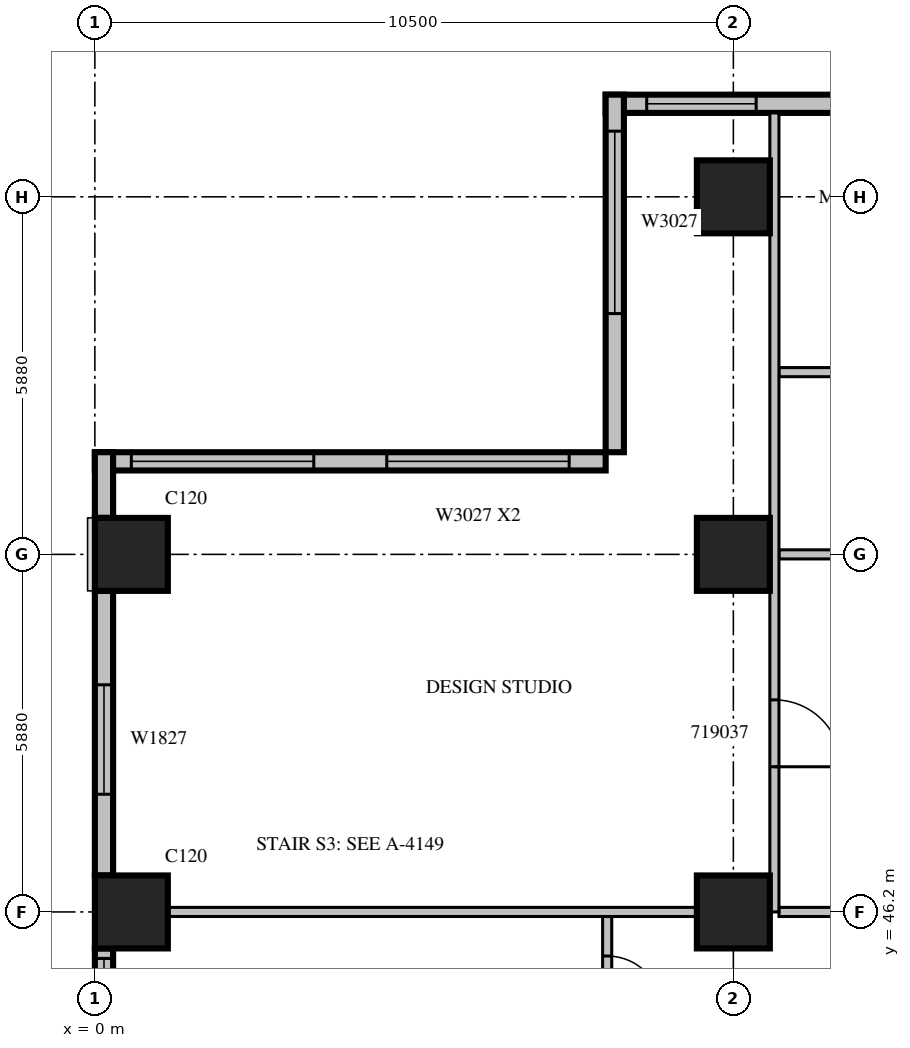
"""IFC4 building model, lengths in metres.
Left out: names, types, materials, properties, quantities, classifications, styles, units other than length and angle.
Written with IfcOpenShell. Run it as: python <this file> out.ifc"""

import sys

from ifc_helpers import new_model, si_unit, direction, frame, frame_2d, origin, origin_2d, place, context, subcontext, project, spatial, rectangle, extrude, source, transform, mapped, element, fill, save


model = new_model("IFC4")
c1 = context("Model", 3, precision=1e-05, world=origin(), true_north=direction((0.0, 1.0)))
c2 = subcontext(c1, "Body", "Model", "MODEL_VIEW")
j1 = project(units=[si_unit("LENGTHUNIT", "METRE"), si_unit("PLANEANGLEUNIT", "RADIAN")], contexts=[c1])
p1 = place(None, origin())
s1 = spatial("IfcSite", under=j1, at=p1, CompositionType="ELEMENT")
p2 = place(p1, origin())
s2 = spatial("IfcBuilding", under=s1, at=p2, CompositionType="ELEMENT")
p3 = place(p2, frame((0.0, 0.0, 90.9)))
s3 = spatial("IfcBuildingStorey", under=s2, at=p3, CompositionType="ELEMENT", Elevation=90.9)
m1 = source(origin(), c2, "Body", "SweptSolid", [
    extrude(rectangle(XDim=1.2, YDim=1.2, at=origin_2d()), origin(), (0.0, 0.0, 1.0), 4.2),
])
for number, where, z_axis, x_axis in (
    (1, (0.6, 46.2, 0.0), (0.0, 0.0, 1.0), (1.0, 0.0, 0.0)),
    (2, (10.5, 46.2, 0.0), (0.0, 0.0, 1.0), (1.0, 0.0, 0.0)),
    (3, (0.6, 52.08, 0.0), (0.0, 0.0, 1.0), (1.0, 0.0, 0.0)),
    (4, (10.5, 52.08, 0.0), (0.0, 0.0, 1.0), (1.0, 0.0, 0.0)),
    (5, (10.5, 57.96, 0.0), (0.0, 0.0, 1.0), (1.0, 0.0, 0.0)),
):
    element("IfcColumn", number, at=place(p3, frame(where, z_axis=z_axis, x_axis=x_axis)), inside=s3, PredefinedType="COLUMN", context=c2, shape_type="MappedRepresentation", body=[
        mapped(m1, transform((0.0, 0.0, 0.0), scale=1.0)),
    ])
m2 = source(origin(), c2, "Body", "SweptSolid", [
    extrude(rectangle(XDim=8.7, YDim=0.3, at=frame_2d((4.35, 0.0))), origin(), (0.0, 0.0, 1.0), 3.8),
])
p4 = place(p3, frame((17.1, 59.49, 0.0), z_axis=(0.0, 0.0, 1.0), x_axis=(-1.0, 0.0, 0.0)))
e6 = element("IfcWall", 6, at=p4, inside=s3, PredefinedType="STANDARD", context=c2, shape_type="MappedRepresentation", body=[
    mapped(m2, transform((0.0, 0.0, 0.0), scale=1.0)),
])
m3 = source(origin(), c2, "Body", "SweptSolid", [
    extrude(rectangle(XDim=1.8, YDim=2.7, at=frame_2d((0.9, 1.35))), frame((0.0, 0.16, 0.0), z_axis=(0.0, -1.0, 0.0), x_axis=(1.0, 0.0, 0.0)), (0.0, 0.0, 1.0), 0.32),
])
p5 = place(p4, frame((3.075, 0.0, 0.6)))
e7 = element("IfcOpeningElement", 7, at=p5, cuts=e6, PredefinedType="OPENING", context=c2, shape_type="MappedRepresentation", body=[
    mapped(m3, transform((0.0, 0.0, 0.0), scale=1.0)),
])
p6 = place(p4, frame((6.225, 0.0, 0.6)))
e8 = element("IfcOpeningElement", 8, at=p6, cuts=e6, PredefinedType="OPENING", context=c2, shape_type="MappedRepresentation", body=[
    mapped(m3, transform((0.0, 0.0, 0.0), scale=1.0)),
])
m4 = source(origin(), c2, "Body", "SweptSolid", [
    extrude(rectangle(XDim=5.88, YDim=0.3, at=frame_2d((2.94, 0.0))), origin(), (0.0, 0.0, 1.0), 3.8),
])
p7 = place(p3, frame((8.55, 59.64, 0.0), z_axis=(0.0, 0.0, 1.0), x_axis=(0.0, -1.0, 0.0)))
e9 = element("IfcWall", 9, at=p7, inside=s3, PredefinedType="STANDARD", context=c2, shape_type="MappedRepresentation", body=[
    mapped(m4, transform((0.0, 0.0, 0.0), scale=1.0)),
])
m5 = source(origin(), c2, "Body", "SweptSolid", [
    extrude(rectangle(XDim=3.0, YDim=2.7, at=frame_2d((1.5, 1.35))), frame((0.0, 0.16, 0.0), z_axis=(0.0, -1.0, 0.0), x_axis=(1.0, 0.0, 0.0)), (0.0, 0.0, 1.0), 0.32),
])
p8 = place(p7, frame((0.6, 0.0, 0.6)))
e10 = element("IfcOpeningElement", 10, at=p8, cuts=e9, PredefinedType="OPENING", context=c2, shape_type="MappedRepresentation", body=[
    mapped(m5, transform((0.0, 0.0, 0.0), scale=1.0)),
])
m6 = source(origin(), c2, "Body", "SweptSolid", [
    extrude(rectangle(XDim=8.4, YDim=0.3, at=frame_2d((4.2, 0.0))), origin(), (0.0, 0.0, 1.0), 3.8),
])
p9 = place(p3, frame((8.4, 53.61, 0.0), z_axis=(0.0, 0.0, 1.0), x_axis=(-1.0, 0.0, 0.0)))
e11 = element("IfcWall", 11, at=p9, inside=s3, PredefinedType="STANDARD", context=c2, shape_type="MappedRepresentation", body=[
    mapped(m6, transform((0.0, 0.0, 0.0), scale=1.0)),
])
p10 = place(p9, frame((0.6, 0.0, 0.6)))
e12 = element("IfcOpeningElement", 12, at=p10, cuts=e11, PredefinedType="OPENING", context=c2, shape_type="MappedRepresentation", body=[
    mapped(m5, transform((0.0, 0.0, 0.0), scale=1.0)),
])
p11 = place(p9, frame((4.8, 0.0, 0.6)))
e13 = element("IfcOpeningElement", 13, at=p11, cuts=e11, PredefinedType="OPENING", context=c2, shape_type="MappedRepresentation", body=[
    mapped(m5, transform((0.0, 0.0, 0.0), scale=1.0)),
])
m7 = source(origin(), c2, "Body", "SweptSolid", [
    extrude(rectangle(XDim=1.08, YDim=0.3, at=frame_2d((0.54, 0.0))), origin(), (0.0, 0.0, 1.0), 3.8),
])
p12 = place(p3, frame((0.15, 53.76, 0.0), z_axis=(0.0, 0.0, 1.0), x_axis=(0.0, -1.0, 0.0)))
e14 = element("IfcWall", 14, at=p12, inside=s3, PredefinedType="STANDARD", context=c2, shape_type="MappedRepresentation", body=[
    mapped(m7, transform((0.0, 0.0, 0.0), scale=1.0)),
])
m8 = source(origin(), c2, "Body", "SweptSolid", [
    extrude(rectangle(XDim=4.68, YDim=0.3, at=frame_2d((2.34, 0.0))), origin(), (0.0, 0.0, 1.0), 3.8),
])
p13 = place(p3, frame((0.15, 51.48, 0.0), z_axis=(0.0, 0.0, 1.0), x_axis=(0.0, -1.0, 0.0)))
e15 = element("IfcWall", 15, at=p13, inside=s3, PredefinedType="STANDARD", context=c2, shape_type="MappedRepresentation", body=[
    mapped(m8, transform((0.0, 0.0, 0.0), scale=1.0)),
])
p14 = place(p13, frame((1.545, 0.0, 0.6)))
e16 = element("IfcOpeningElement", 16, at=p14, cuts=e15, PredefinedType="OPENING", context=c2, shape_type="MappedRepresentation", body=[
    mapped(m3, transform((0.0, 0.0, 0.0), scale=1.0)),
])
m9 = source(origin(), c2, "Body", "SweptSolid", [
    extrude(rectangle(XDim=1.6, YDim=0.3, at=frame_2d((0.8, 0.0))), origin(), (0.0, 0.0, 1.0), 3.8),
])
p15 = place(p3, frame((0.15, 45.6, 0.0), z_axis=(0.0, 0.0, 1.0), x_axis=(0.0, -1.0, 0.0)))
e17 = element("IfcWall", 17, at=p15, inside=s3, PredefinedType="STANDARD", context=c2, shape_type="MappedRepresentation", body=[
    mapped(m9, transform((0.0, 0.0, 0.0), scale=1.0)),
])
m10 = source(origin(), c2, "Body", "SweptSolid", [
    extrude(rectangle(XDim=1.2, YDim=2.7, at=frame_2d((0.6, 1.35))), frame((0.0, 0.16, 0.0), z_axis=(0.0, -1.0, 0.0), x_axis=(1.0, 0.0, 0.0)), (0.0, 0.0, 1.0), 0.32),
])
p16 = place(p15, frame((0.165, 0.0, 0.6)))
e18 = element("IfcOpeningElement", 18, at=p16, cuts=e17, PredefinedType="OPENING", context=c2, shape_type="MappedRepresentation", body=[
    mapped(m10, transform((0.0, 0.0, 0.0), scale=1.0)),
])
m11 = source(origin(), c2, "Body", "SweptSolid", [
    extrude(rectangle(XDim=2.2, YDim=0.15, at=frame_2d((1.1, 0.0))), origin(), (0.0, 0.0, 1.0), 3.8),
])
p17 = place(p3, frame((8.425, 43.925, 0.0), z_axis=(0.0, 0.0, 1.0), x_axis=(0.0, 1.0, 0.0)))
e19 = element("IfcWall", 19, at=p17, inside=s3, PredefinedType="PARTITIONING", context=c2, shape_type="MappedRepresentation", body=[
    mapped(m11, transform((0.0, 0.0, 0.0), scale=1.0)),
])
m12 = source(origin(), c2, "Body", "SweptSolid", [
    extrude(rectangle(XDim=0.9, YDim=2.1, at=frame_2d((0.45, 1.05))), frame((0.0, 0.085, 0.0), z_axis=(0.0, -1.0, 0.0), x_axis=(1.0, 0.0, 0.0)), (0.0, 0.0, 1.0), 0.17),
])
p18 = place(p17, frame((0.65, 0.0, 0.0)))
e20 = element("IfcOpeningElement", 20, at=p18, cuts=e19, PredefinedType="OPENING", context=c2, shape_type="MappedRepresentation", body=[
    mapped(m12, transform((0.0, 0.0, 0.0), scale=1.0)),
])
m13 = source(origin(), c2, "Body", "SweptSolid", [
    extrude(rectangle(XDim=3.75, YDim=0.15, at=frame_2d((1.875, 0.0))), origin(), (0.0, 0.0, 1.0), 3.8),
])
for number, where, z_axis, x_axis in (
    (21, (15.0, 52.08, 0.0), (0.0, 0.0, 1.0), (-1.0, 0.0, 0.0)),
    (22, (15.0, 55.077, 0.0), (0.0, 0.0, 1.0), (-1.0, 0.0, 0.0)),
):
    element("IfcWall", number, at=place(p3, frame(where, z_axis=z_axis, x_axis=x_axis)), inside=s3, PredefinedType="PARTITIONING", context=c2, shape_type="MappedRepresentation", body=[
        mapped(m13, transform((0.0, 0.0, 0.0), scale=1.0)),
    ])
m14 = source(origin(), c2, "Body", "SweptSolid", [
    extrude(rectangle(XDim=8.702, YDim=0.15, at=frame_2d((4.351, 0.0))), origin(), (0.0, 0.0, 1.0), 3.8),
])
p19 = place(p3, frame((9.901, 46.2, 0.0), z_axis=(0.0, 0.0, 1.0), x_axis=(-1.0, 0.0, 0.0)))
e23 = element("IfcWall", 23, at=p19, inside=s3, PredefinedType="PARTITIONING", context=c2, shape_type="MappedRepresentation", body=[
    mapped(m14, transform((0.0, 0.0, 0.0), scale=1.0)),
])
p20 = place(p3, frame((15.0, 46.2, 0.0), z_axis=(0.0, 0.0, 1.0), x_axis=(-1.0, 0.0, 0.0)))
e24 = element("IfcWall", 24, at=p20, inside=s3, PredefinedType="PARTITIONING", context=c2, shape_type="MappedRepresentation", body=[
    mapped(m13, transform((0.0, 0.0, 0.0), scale=1.0)),
])
m15 = source(origin(), c2, "Body", "SweptSolid", [
    extrude(rectangle(XDim=13.14, YDim=0.15, at=frame_2d((6.57, 0.0))), origin(), (0.0, 0.0, 1.0), 3.8),
])
p21 = place(p3, frame((11.175, 46.2, 0.0), z_axis=(0.0, 0.0, 1.0), x_axis=(0.0, 1.0, 0.0)))
e25 = element("IfcWall", 25, at=p21, inside=s3, PredefinedType="PARTITIONING", context=c2, shape_type="MappedRepresentation", body=[
    mapped(m15, transform((0.0, 0.0, 0.0), scale=1.0)),
])
m16 = source(origin(), c2, "Body", "SweptSolid", [
    extrude(rectangle(XDim=1.1, YDim=2.1, at=frame_2d((0.55, 1.05))), frame((0.0, 0.085, 0.0), z_axis=(0.0, -1.0, 0.0), x_axis=(1.0, 0.0, 0.0)), (0.0, 0.0, 1.0), 0.17),
])
p22 = place(p21, frame((2.388, 0.0, 0.0)))
e26 = element("IfcOpeningElement", 26, at=p22, cuts=e25, PredefinedType="OPENING", context=c2, shape_type="MappedRepresentation", body=[
    mapped(m16, transform((0.0, 0.0, 0.0), scale=1.0)),
])
m17 = source(origin(), c2, "Body", "SweptSolid", [
    extrude(rectangle(XDim=1.8, YDim=2.7, at=frame_2d((0.9, 1.35))), frame((0.0, 0.03, 0.0), z_axis=(0.0, -1.0, 0.0), x_axis=(1.0, 0.0, 0.0)), (0.0, 0.0, 1.0), 0.06),
])
p23 = place(p6, origin())
e27 = element("IfcWindow", 27, at=p23, inside=s3, PartitioningType="SINGLE_PANEL", PredefinedType="WINDOW", context=c2, shape_type="MappedRepresentation", body=[
    mapped(m17, transform((0.0, 0.0, 0.0), scale=1.0)),
])
fill(e8, e27)
m18 = source(origin(), c2, "Body", "SweptSolid", [
    extrude(rectangle(XDim=3.0, YDim=2.7, at=frame_2d((1.5, 1.35))), frame((0.0, 0.03, 0.0), z_axis=(0.0, -1.0, 0.0), x_axis=(1.0, 0.0, 0.0)), (0.0, 0.0, 1.0), 0.06),
])
p24 = place(p8, origin())
e28 = element("IfcWindow", 28, at=p24, inside=s3, PartitioningType="SINGLE_PANEL", PredefinedType="WINDOW", context=c2, shape_type="MappedRepresentation", body=[
    mapped(m18, transform((0.0, 0.0, 0.0), scale=1.0)),
])
fill(e10, e28)
p25 = place(p10, origin())
e29 = element("IfcWindow", 29, at=p25, inside=s3, PartitioningType="SINGLE_PANEL", PredefinedType="WINDOW", context=c2, shape_type="MappedRepresentation", body=[
    mapped(m18, transform((0.0, 0.0, 0.0), scale=1.0)),
])
fill(e12, e29)
p26 = place(p11, origin())
e30 = element("IfcWindow", 30, at=p26, inside=s3, PartitioningType="SINGLE_PANEL", PredefinedType="WINDOW", context=c2, shape_type="MappedRepresentation", body=[
    mapped(m18, transform((0.0, 0.0, 0.0), scale=1.0)),
])
fill(e13, e30)
p27 = place(p14, origin())
e31 = element("IfcWindow", 31, at=p27, inside=s3, PartitioningType="SINGLE_PANEL", PredefinedType="WINDOW", context=c2, shape_type="MappedRepresentation", body=[
    mapped(m17, transform((0.0, 0.0, 0.0), scale=1.0)),
])
fill(e16, e31)
m19 = source(origin(), c2, "Body", "SweptSolid", [
    extrude(rectangle(XDim=1.2, YDim=2.7, at=frame_2d((0.6, 1.35))), frame((0.0, 0.03, 0.0), z_axis=(0.0, -1.0, 0.0), x_axis=(1.0, 0.0, 0.0)), (0.0, 0.0, 1.0), 0.06),
])
p28 = place(p16, origin())
e32 = element("IfcWindow", 32, at=p28, inside=s3, PartitioningType="SINGLE_PANEL", PredefinedType="WINDOW", context=c2, shape_type="MappedRepresentation", body=[
    mapped(m19, transform((0.0, 0.0, 0.0), scale=1.0)),
])
fill(e18, e32)
m20 = source(origin(), c2, "Body", "SweptSolid", [
    extrude(rectangle(XDim=0.9, YDim=2.1, at=frame_2d((0.45, 1.05))), frame((0.0, 0.025, 0.0), z_axis=(0.0, -1.0, 0.0), x_axis=(1.0, 0.0, 0.0)), (0.0, 0.0, 1.0), 0.05),
])
p29 = place(p18, origin())
e33 = element("IfcDoor", 33, at=p29, inside=s3, OperationType="SINGLE_SWING_RIGHT", PredefinedType="DOOR", context=c2, shape_type="MappedRepresentation", body=[
    mapped(m20, transform((0.0, 0.0, 0.0), scale=1.0)),
])
fill(e20, e33)
m21 = source(origin(), c2, "Body", "SweptSolid", [
    extrude(rectangle(XDim=1.1, YDim=2.1, at=frame_2d((0.55, 1.05))), frame((0.0, 0.025, 0.0), z_axis=(0.0, -1.0, 0.0), x_axis=(1.0, 0.0, 0.0)), (0.0, 0.0, 1.0), 0.05),
])
p30 = place(p22, origin())
e34 = element("IfcDoor", 34, at=p30, inside=s3, OperationType="SINGLE_SWING_RIGHT", PredefinedType="DOOR", context=c2, shape_type="MappedRepresentation", body=[
    mapped(m21, transform((0.0, 0.0, 0.0), scale=1.0)),
])
fill(e26, e34)
save(model, sys.argv[1])
